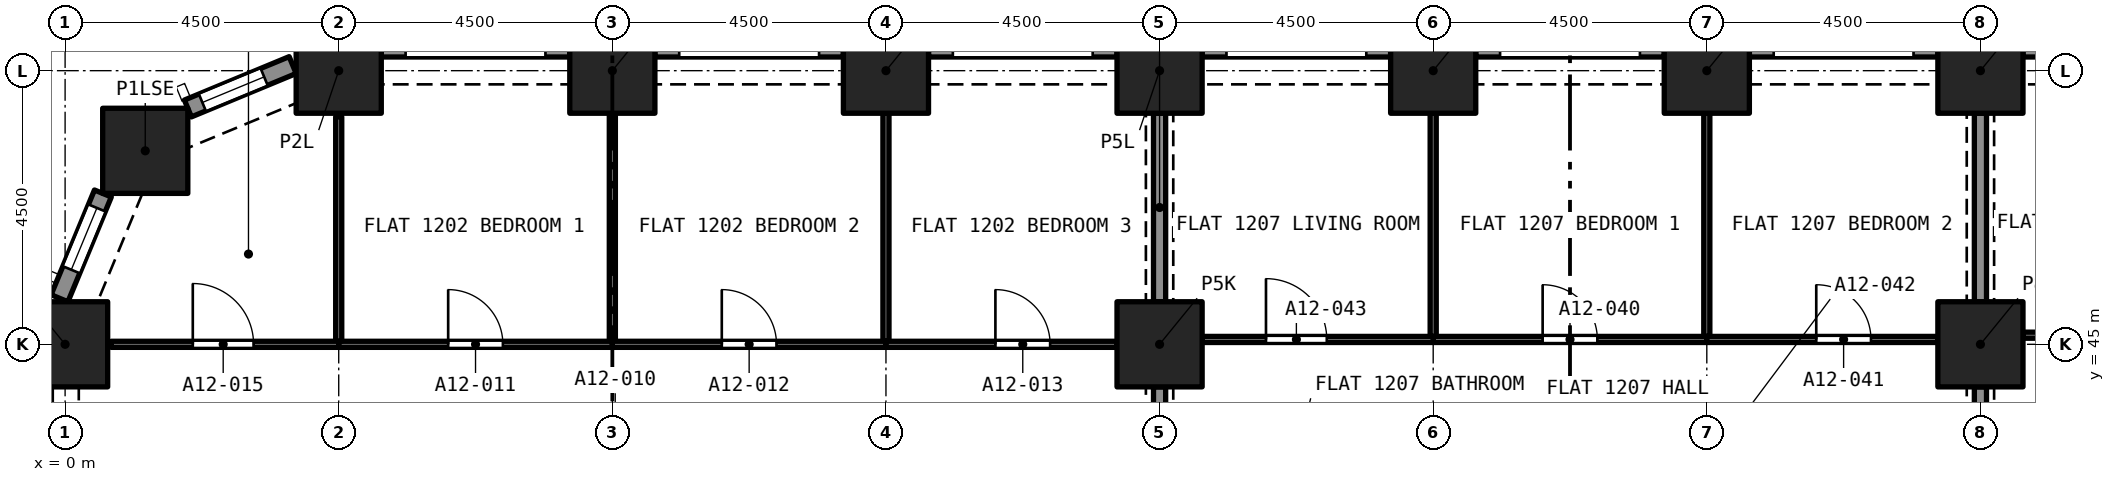
"""IFC4 building model, lengths in metres.
Left out: names, types, materials, properties, quantities, classifications, styles, units other than length and angle.
Written with IfcOpenShell. Run it as: python <this file> out.ifc"""

import sys

from ifc_helpers import new_model, si_unit, direction, frame, frame_2d, origin, origin_2d, place, context, subcontext, project, spatial, rectangle, extrude, element, fill, save


model = new_model("IFC4")
c1 = context("Model", 3, precision=1e-05, world=origin(), true_north=direction((0.0, 1.0)))
c2 = subcontext(c1, "Body", "Model", "MODEL_VIEW")
j1 = project(units=[si_unit("LENGTHUNIT", "METRE"), si_unit("PLANEANGLEUNIT", "RADIAN")], contexts=[c1])
p1 = place(None, origin())
s1 = spatial("IfcSite", under=j1, at=p1, CompositionType="ELEMENT")
p2 = place(p1, origin())
s2 = spatial("IfcBuilding", under=s1, at=p2, CompositionType="ELEMENT")
p3 = place(p2, frame((0.0, 0.0, 49.6)))
s3 = spatial("IfcBuildingStorey", under=s2, at=p3, CompositionType="ELEMENT", Elevation=49.6)
for number, where, z_axis, x_axis in (
    (1, (0.0, 45.0, 0.0), (0.0, 0.0, 1.0), (1.0, 0.0, 0.0)),
    (2, (18.0, 45.0, 0.0), (0.0, 0.0, 1.0), (1.0, 0.0, 0.0)),
    (3, (31.5, 45.0, 0.0), (0.0, 0.0, 1.0), (1.0, 0.0, 0.0)),
    (4, (1.318, 48.182, 0.0), (0.0, 0.0, 1.0), (1.0, 0.0, 0.0)),
    (5, (4.5, 49.5, 0.0), (0.0, 0.0, 1.0), (1.0, 0.0, 0.0)),
    (6, (9.0, 49.5, 0.0), (0.0, 0.0, 1.0), (1.0, 0.0, 0.0)),
    (7, (13.5, 49.5, 0.0), (0.0, 0.0, 1.0), (1.0, 0.0, 0.0)),
    (8, (18.0, 49.5, 0.0), (0.0, 0.0, 1.0), (1.0, 0.0, 0.0)),
    (9, (22.5, 49.5, 0.0), (0.0, 0.0, 1.0), (1.0, 0.0, 0.0)),
    (10, (27.0, 49.5, 0.0), (0.0, 0.0, 1.0), (1.0, 0.0, 0.0)),
    (11, (31.5, 49.5, 0.0), (0.0, 0.0, 1.0), (1.0, 0.0, 0.0)),
):
    element("IfcColumn", number, at=place(p3, frame(where, z_axis=z_axis, x_axis=x_axis)), inside=s3, PredefinedType="COLUMN", context=c2, shape_type="SweptSolid", body=[
        extrude(rectangle(XDim=1.4, YDim=1.4, at=origin_2d()), origin(), (0.0, 0.0, 1.0), 3.2),
    ])
p4 = place(p3, frame((32.2, 49.875, 0.0), z_axis=(0.0, 0.0, 1.0), x_axis=(1.0, 0.0, 0.0)))
e12 = element("IfcWall", 12, at=p4, inside=s3, PredefinedType="SOLIDWALL", context=c2, shape_type="SweptSolid", body=[
    extrude(rectangle(XDim=3.1, YDim=0.3, at=frame_2d((1.55, 0.0))), origin(), (0.0, 0.0, 1.0), 3.2),
])
p5 = place(p4, frame((0.4, 0.0, 0.45)))
e13 = element("IfcOpeningElement", 13, at=p5, cuts=e12, PredefinedType="OPENING", context=c2, shape_type="SweptSolid", body=[
    extrude(rectangle(XDim=2.3, YDim=1.95, at=frame_2d((1.15, 0.975))), frame((0.0, 0.16, 0.0), z_axis=(0.0, -1.0, 0.0), x_axis=(1.0, 0.0, 0.0)), (0.0, 0.0, 1.0), 0.32),
])
p6 = place(p3, frame((27.7, 49.875, 0.0), z_axis=(0.0, 0.0, 1.0), x_axis=(1.0, 0.0, 0.0)))
e14 = element("IfcWall", 14, at=p6, inside=s3, PredefinedType="SOLIDWALL", context=c2, shape_type="SweptSolid", body=[
    extrude(rectangle(XDim=3.1, YDim=0.3, at=frame_2d((1.55, 0.0))), origin(), (0.0, 0.0, 1.0), 3.2),
])
p7 = place(p6, frame((0.4, 0.0, 0.45)))
e15 = element("IfcOpeningElement", 15, at=p7, cuts=e14, PredefinedType="OPENING", context=c2, shape_type="SweptSolid", body=[
    extrude(rectangle(XDim=2.3, YDim=1.95, at=frame_2d((1.15, 0.975))), frame((0.0, 0.16, 0.0), z_axis=(0.0, -1.0, 0.0), x_axis=(1.0, 0.0, 0.0)), (0.0, 0.0, 1.0), 0.32),
])
p8 = place(p3, frame((23.2, 49.875, 0.0), z_axis=(0.0, 0.0, 1.0), x_axis=(1.0, 0.0, 0.0)))
e16 = element("IfcWall", 16, at=p8, inside=s3, PredefinedType="SOLIDWALL", context=c2, shape_type="SweptSolid", body=[
    extrude(rectangle(XDim=3.1, YDim=0.3, at=frame_2d((1.55, 0.0))), origin(), (0.0, 0.0, 1.0), 3.2),
])
p9 = place(p8, frame((0.4, 0.0, 0.45)))
e17 = element("IfcOpeningElement", 17, at=p9, cuts=e16, PredefinedType="OPENING", context=c2, shape_type="SweptSolid", body=[
    extrude(rectangle(XDim=2.3, YDim=1.95, at=frame_2d((1.15, 0.975))), frame((0.0, 0.16, 0.0), z_axis=(0.0, -1.0, 0.0), x_axis=(1.0, 0.0, 0.0)), (0.0, 0.0, 1.0), 0.32),
])
p10 = place(p3, frame((18.7, 49.875, 0.0), z_axis=(0.0, 0.0, 1.0), x_axis=(1.0, 0.0, 0.0)))
e18 = element("IfcWall", 18, at=p10, inside=s3, PredefinedType="SOLIDWALL", context=c2, shape_type="SweptSolid", body=[
    extrude(rectangle(XDim=3.1, YDim=0.3, at=frame_2d((1.55, 0.0))), origin(), (0.0, 0.0, 1.0), 3.2),
])
p11 = place(p10, frame((0.4, 0.0, 0.45)))
e19 = element("IfcOpeningElement", 19, at=p11, cuts=e18, PredefinedType="OPENING", context=c2, shape_type="SweptSolid", body=[
    extrude(rectangle(XDim=2.3, YDim=1.95, at=frame_2d((1.15, 0.975))), frame((0.0, 0.16, 0.0), z_axis=(0.0, -1.0, 0.0), x_axis=(1.0, 0.0, 0.0)), (0.0, 0.0, 1.0), 0.32),
])
p12 = place(p3, frame((14.2, 49.875, 0.0), z_axis=(0.0, 0.0, 1.0), x_axis=(1.0, 0.0, 0.0)))
e20 = element("IfcWall", 20, at=p12, inside=s3, PredefinedType="SOLIDWALL", context=c2, shape_type="SweptSolid", body=[
    extrude(rectangle(XDim=3.1, YDim=0.3, at=frame_2d((1.55, 0.0))), origin(), (0.0, 0.0, 1.0), 3.2),
])
p13 = place(p12, frame((0.4, 0.0, 0.45)))
e21 = element("IfcOpeningElement", 21, at=p13, cuts=e20, PredefinedType="OPENING", context=c2, shape_type="SweptSolid", body=[
    extrude(rectangle(XDim=2.3, YDim=1.95, at=frame_2d((1.15, 0.975))), frame((0.0, 0.16, 0.0), z_axis=(0.0, -1.0, 0.0), x_axis=(1.0, 0.0, 0.0)), (0.0, 0.0, 1.0), 0.32),
])
p14 = place(p3, frame((9.7, 49.875, 0.0), z_axis=(0.0, 0.0, 1.0), x_axis=(1.0, 0.0, 0.0)))
e22 = element("IfcWall", 22, at=p14, inside=s3, PredefinedType="SOLIDWALL", context=c2, shape_type="SweptSolid", body=[
    extrude(rectangle(XDim=3.1, YDim=0.3, at=frame_2d((1.55, 0.0))), origin(), (0.0, 0.0, 1.0), 3.2),
])
p15 = place(p14, frame((0.4, 0.0, 0.45)))
e23 = element("IfcOpeningElement", 23, at=p15, cuts=e22, PredefinedType="OPENING", context=c2, shape_type="SweptSolid", body=[
    extrude(rectangle(XDim=2.3, YDim=1.95, at=frame_2d((1.15, 0.975))), frame((0.0, 0.16, 0.0), z_axis=(0.0, -1.0, 0.0), x_axis=(1.0, 0.0, 0.0)), (0.0, 0.0, 1.0), 0.32),
])
p16 = place(p3, frame((5.2, 49.875, 0.0), z_axis=(0.0, 0.0, 1.0), x_axis=(1.0, 0.0, 0.0)))
e24 = element("IfcWall", 24, at=p16, inside=s3, PredefinedType="SOLIDWALL", context=c2, shape_type="SweptSolid", body=[
    extrude(rectangle(XDim=3.1, YDim=0.3, at=frame_2d((1.55, 0.0))), origin(), (0.0, 0.0, 1.0), 3.2),
])
p17 = place(p16, frame((0.4, 0.0, 0.45)))
e25 = element("IfcOpeningElement", 25, at=p17, cuts=e24, PredefinedType="OPENING", context=c2, shape_type="SweptSolid", body=[
    extrude(rectangle(XDim=2.3, YDim=1.95, at=frame_2d((1.15, 0.975))), frame((0.0, 0.16, 0.0), z_axis=(0.0, -1.0, 0.0), x_axis=(1.0, 0.0, 0.0)), (0.0, 0.0, 1.0), 0.32),
])
p18 = place(p3, frame((2.02, 48.878, 0.0), z_axis=(0.0, 0.0, 1.0), x_axis=(0.923903565336, 0.38262540684, 0.0)))
e26 = element("IfcWall", 26, at=p18, inside=s3, PredefinedType="SOLIDWALL", context=c2, shape_type="SweptSolid", body=[
    extrude(rectangle(XDim=1.865, YDim=0.3, at=frame_2d((0.933, 0.0))), origin(), (0.0, 0.0, 1.0), 3.2),
])
p19 = place(p18, frame((0.258, 0.0, 0.45)))
e27 = element("IfcOpeningElement", 27, at=p19, cuts=e26, PredefinedType="OPENING", context=c2, shape_type="SweptSolid", body=[
    extrude(rectangle(XDim=1.1, YDim=1.95, at=frame_2d((0.55, 0.975))), frame((0.0, 0.16, 0.0), z_axis=(0.0, -1.0, 0.0), x_axis=(1.0, 0.0, 0.0)), (0.0, 0.0, 1.0), 0.32),
])
p20 = place(p3, frame((-0.092, 45.757, 0.0), z_axis=(0.0, 0.0, 1.0), x_axis=(0.382737135771, 0.923857286003, 0.0)))
e28 = element("IfcWall", 28, at=p20, inside=s3, PredefinedType="SOLIDWALL", context=c2, shape_type="SweptSolid", body=[
    extrude(rectangle(XDim=1.865, YDim=0.3, at=frame_2d((0.933, 0.0))), origin(), (0.0, 0.0, 1.0), 3.2),
])
p21 = place(p20, frame((0.508, 0.0, 0.45)))
e29 = element("IfcOpeningElement", 29, at=p21, cuts=e28, PredefinedType="OPENING", context=c2, shape_type="SweptSolid", body=[
    extrude(rectangle(XDim=1.1, YDim=1.95, at=frame_2d((0.55, 0.975))), frame((0.0, 0.16, 0.0), z_axis=(0.0, -1.0, 0.0), x_axis=(1.0, 0.0, 0.0)), (0.0, 0.0, 1.0), 0.32),
])
p22 = place(p3, frame((9.0, 45.05, 0.0), z_axis=(0.0, 0.0, 1.0), x_axis=(0.0, 1.0, 0.0)))
e30 = element("IfcWall", 30, at=p22, inside=s3, PredefinedType="PARTITIONING", context=c2, shape_type="SweptSolid", body=[
    extrude(rectangle(XDim=3.75, YDim=0.1, at=frame_2d((1.875, 0.0))), origin(), (0.0, 0.0, 1.0), 2.9),
])
p23 = place(p3, frame((4.5, 45.0, 0.0), z_axis=(0.0, 0.0, 1.0), x_axis=(1.0, 0.0, 0.0)))
e31 = element("IfcWall", 31, at=p23, inside=s3, PredefinedType="PARTITIONING", context=c2, shape_type="SweptSolid", body=[
    extrude(rectangle(XDim=4.5, YDim=0.1, at=frame_2d((2.25, 0.0))), origin(), (0.0, 0.0, 1.0), 2.9),
])
p24 = place(p23, frame((1.8, 0.0, 0.0)))
e32 = element("IfcOpeningElement", 32, at=p24, cuts=e31, PredefinedType="OPENING", context=c2, shape_type="SweptSolid", body=[
    extrude(rectangle(XDim=0.9, YDim=2.1, at=frame_2d((0.45, 1.05))), frame((0.0, 0.06, 0.0), z_axis=(0.0, -1.0, 0.0), x_axis=(1.0, 0.0, 0.0)), (0.0, 0.0, 1.0), 0.12),
])
p25 = place(p3, frame((4.5, 45.05, 0.0), z_axis=(0.0, 0.0, 1.0), x_axis=(0.0, 1.0, 0.0)))
e33 = element("IfcWall", 33, at=p25, inside=s3, PredefinedType="PARTITIONING", context=c2, shape_type="SweptSolid", body=[
    extrude(rectangle(XDim=3.692, YDim=0.1, at=frame_2d((1.846, 0.0))), origin(), (0.0, 0.0, 1.0), 2.9),
])
p26 = place(p3, frame((13.5, 45.05, 0.0), z_axis=(0.0, 0.0, 1.0), x_axis=(0.0, 1.0, 0.0)))
e34 = element("IfcWall", 34, at=p26, inside=s3, PredefinedType="PARTITIONING", context=c2, shape_type="SweptSolid", body=[
    extrude(rectangle(XDim=3.75, YDim=0.1, at=frame_2d((1.875, 0.0))), origin(), (0.0, 0.0, 1.0), 2.9),
])
p27 = place(p3, frame((9.0, 45.0, 0.0), z_axis=(0.0, 0.0, 1.0), x_axis=(1.0, 0.0, 0.0)))
e35 = element("IfcWall", 35, at=p27, inside=s3, PredefinedType="PARTITIONING", context=c2, shape_type="SweptSolid", body=[
    extrude(rectangle(XDim=4.5, YDim=0.1, at=frame_2d((2.25, 0.0))), origin(), (0.0, 0.0, 1.0), 2.9),
])
p28 = place(p27, frame((1.8, 0.0, 0.0)))
e36 = element("IfcOpeningElement", 36, at=p28, cuts=e35, PredefinedType="OPENING", context=c2, shape_type="SweptSolid", body=[
    extrude(rectangle(XDim=0.9, YDim=2.1, at=frame_2d((0.45, 1.05))), frame((0.0, 0.06, 0.0), z_axis=(0.0, -1.0, 0.0), x_axis=(1.0, 0.0, 0.0)), (0.0, 0.0, 1.0), 0.12),
])
p29 = place(p3, frame((13.5, 45.0, 0.0), z_axis=(0.0, 0.0, 1.0), x_axis=(1.0, 0.0, 0.0)))
e37 = element("IfcWall", 37, at=p29, inside=s3, PredefinedType="PARTITIONING", context=c2, shape_type="SweptSolid", body=[
    extrude(rectangle(XDim=3.8, YDim=0.1, at=frame_2d((1.9, 0.0))), origin(), (0.0, 0.0, 1.0), 2.9),
])
p30 = place(p29, frame((1.8, 0.0, 0.0)))
e38 = element("IfcOpeningElement", 38, at=p30, cuts=e37, PredefinedType="OPENING", context=c2, shape_type="SweptSolid", body=[
    extrude(rectangle(XDim=0.9, YDim=2.1, at=frame_2d((0.45, 1.05))), frame((0.0, 0.06, 0.0), z_axis=(0.0, -1.0, 0.0), x_axis=(1.0, 0.0, 0.0)), (0.0, 0.0, 1.0), 0.12),
])
p31 = place(p3, frame((18.0, 45.7, 0.0), z_axis=(0.0, 0.0, 1.0), x_axis=(0.0, 1.0, 0.0)))
e39 = element("IfcWall", 39, at=p31, inside=s3, PredefinedType="PARTITIONING", context=c2, shape_type="SweptSolid", body=[
    extrude(rectangle(XDim=3.1, YDim=0.2, at=frame_2d((1.55, 0.0))), origin(), (0.0, 0.0, 1.0), 2.38),
])
p32 = place(p3, frame((0.758, 45.0, 0.0), z_axis=(0.0, 0.0, 1.0), x_axis=(1.0, 0.0, 0.0)))
e40 = element("IfcWall", 40, at=p32, inside=s3, PredefinedType="PARTITIONING", context=c2, shape_type="SweptSolid", body=[
    extrude(rectangle(XDim=3.742, YDim=0.1, at=frame_2d((1.871, 0.0))), origin(), (0.0, 0.0, 1.0), 2.9),
])
p33 = place(p32, frame((1.342, 0.0, 0.0)))
e41 = element("IfcOpeningElement", 41, at=p33, cuts=e40, PredefinedType="OPENING", context=c2, shape_type="SweptSolid", body=[
    extrude(rectangle(XDim=1.0, YDim=2.1, at=frame_2d((0.5, 1.05))), frame((0.0, 0.06, 0.0), z_axis=(0.0, -1.0, 0.0), x_axis=(1.0, 0.0, 0.0)), (0.0, 0.0, 1.0), 0.12),
])
p34 = place(p3, frame((18.0, 43.67, 0.0), z_axis=(0.0, 0.0, 1.0), x_axis=(0.0, 1.0, 0.0)))
e42 = element("IfcWall", 42, at=p34, inside=s3, PredefinedType="PARTITIONING", context=c2, shape_type="SweptSolid", body=[
    extrude(rectangle(XDim=0.63, YDim=0.2, at=frame_2d((0.315, 0.0))), origin(), (0.0, 0.0, 1.0), 2.38),
])
p35 = place(p3, frame((32.2, 45.15, 0.0), z_axis=(0.0, 0.0, 1.0), x_axis=(1.0, 0.0, 0.0)))
e43 = element("IfcWall", 43, at=p35, inside=s3, PredefinedType="PARTITIONING", context=c2, shape_type="SweptSolid", body=[
    extrude(rectangle(XDim=3.8, YDim=0.1, at=frame_2d((1.9, 0.0))), origin(), (0.0, 0.0, 1.0), 2.9),
])
p36 = place(p35, frame((1.05, 0.0, 0.0)))
e44 = element("IfcOpeningElement", 44, at=p36, cuts=e43, PredefinedType="OPENING", context=c2, shape_type="SweptSolid", body=[
    extrude(rectangle(XDim=1.0, YDim=2.1, at=frame_2d((0.5, 1.05))), frame((0.0, 0.06, 0.0), z_axis=(0.0, -1.0, 0.0), x_axis=(1.0, 0.0, 0.0)), (0.0, 0.0, 1.0), 0.12),
])
for number, where, z_axis, x_axis in (
    (45, (31.5, 41.2, 0.0), (0.0, 0.0, 1.0), (0.0, 1.0, 0.0)),
    (46, (31.5, 45.7, 0.0), (0.0, 0.0, 1.0), (0.0, 1.0, 0.0)),
):
    element("IfcWall", number, at=place(p3, frame(where, z_axis=z_axis, x_axis=x_axis)), inside=s3, PredefinedType="PARTITIONING", context=c2, shape_type="SweptSolid", body=[
        extrude(rectangle(XDim=3.1, YDim=0.2, at=frame_2d((1.55, 0.0))), origin(), (0.0, 0.0, 1.0), 2.38),
    ])
p37 = place(p3, frame((27.0, 45.13, 0.0), z_axis=(0.0, 0.0, 1.0), x_axis=(0.0, 1.0, 0.0)))
e47 = element("IfcWall", 47, at=p37, inside=s3, PredefinedType="PARTITIONING", context=c2, shape_type="SweptSolid", body=[
    extrude(rectangle(XDim=3.67, YDim=0.1, at=frame_2d((1.835, 0.0))), origin(), (0.0, 0.0, 1.0), 2.75),
])
p38 = place(p3, frame((22.5, 45.08, 0.0), z_axis=(0.0, 0.0, 1.0), x_axis=(1.0, 0.0, 0.0)))
e48 = element("IfcWall", 48, at=p38, inside=s3, PredefinedType="PARTITIONING", context=c2, shape_type="SweptSolid", body=[
    extrude(rectangle(XDim=4.5, YDim=0.1, at=frame_2d((2.25, 0.0))), origin(), (0.0, 0.0, 1.0), 2.75),
])
p39 = place(p38, frame((1.8, 0.0, 0.0)))
e49 = element("IfcOpeningElement", 49, at=p39, cuts=e48, PredefinedType="OPENING", context=c2, shape_type="SweptSolid", body=[
    extrude(rectangle(XDim=0.9, YDim=2.1, at=frame_2d((0.45, 1.05))), frame((0.0, 0.06, 0.0), z_axis=(0.0, -1.0, 0.0), x_axis=(1.0, 0.0, 0.0)), (0.0, 0.0, 1.0), 0.12),
])
p40 = place(p3, frame((22.5, 45.13, 0.0), z_axis=(0.0, 0.0, 1.0), x_axis=(0.0, 1.0, 0.0)))
e50 = element("IfcWall", 50, at=p40, inside=s3, PredefinedType="PARTITIONING", context=c2, shape_type="SweptSolid", body=[
    extrude(rectangle(XDim=3.67, YDim=0.1, at=frame_2d((1.835, 0.0))), origin(), (0.0, 0.0, 1.0), 2.75),
])
p41 = place(p3, frame((27.0, 45.08, 0.0), z_axis=(0.0, 0.0, 1.0), x_axis=(1.0, 0.0, 0.0)))
e51 = element("IfcWall", 51, at=p41, inside=s3, PredefinedType="PARTITIONING", context=c2, shape_type="SweptSolid", body=[
    extrude(rectangle(XDim=3.8, YDim=0.1, at=frame_2d((1.9, 0.0))), origin(), (0.0, 0.0, 1.0), 2.75),
])
p42 = place(p41, frame((1.8, 0.0, 0.0)))
e52 = element("IfcOpeningElement", 52, at=p42, cuts=e51, PredefinedType="OPENING", context=c2, shape_type="SweptSolid", body=[
    extrude(rectangle(XDim=0.9, YDim=2.1, at=frame_2d((0.45, 1.05))), frame((0.0, 0.06, 0.0), z_axis=(0.0, -1.0, 0.0), x_axis=(1.0, 0.0, 0.0)), (0.0, 0.0, 1.0), 0.12),
])
p43 = place(p3, frame((18.7, 45.08, 0.0), z_axis=(0.0, 0.0, 1.0), x_axis=(1.0, 0.0, 0.0)))
e53 = element("IfcWall", 53, at=p43, inside=s3, PredefinedType="PARTITIONING", context=c2, shape_type="SweptSolid", body=[
    extrude(rectangle(XDim=3.8, YDim=0.1, at=frame_2d((1.9, 0.0))), origin(), (0.0, 0.0, 1.0), 2.75),
])
p44 = place(p43, frame((1.05, 0.0, 0.0)))
e54 = element("IfcOpeningElement", 54, at=p44, cuts=e53, PredefinedType="OPENING", context=c2, shape_type="SweptSolid", body=[
    extrude(rectangle(XDim=1.0, YDim=2.1, at=frame_2d((0.5, 1.05))), frame((0.0, 0.06, 0.0), z_axis=(0.0, -1.0, 0.0), x_axis=(1.0, 0.0, 0.0)), (0.0, 0.0, 1.0), 0.12),
])
p45 = place(p19, origin())
e55 = element("IfcWindow", 55, at=p45, inside=s3, PartitioningType="SINGLE_PANEL", PredefinedType="WINDOW", context=c2, shape_type="SweptSolid", body=[
    extrude(rectangle(XDim=1.1, YDim=1.95, at=frame_2d((0.55, 0.975))), frame((0.0, 0.03, 0.0), z_axis=(0.0, -1.0, 0.0), x_axis=(1.0, 0.0, 0.0)), (0.0, 0.0, 1.0), 0.06),
])
fill(e27, e55)
p46 = place(p21, origin())
e56 = element("IfcWindow", 56, at=p46, inside=s3, PartitioningType="SINGLE_PANEL", PredefinedType="WINDOW", context=c2, shape_type="SweptSolid", body=[
    extrude(rectangle(XDim=1.1, YDim=1.95, at=frame_2d((0.55, 0.975))), frame((0.0, 0.03, 0.0), z_axis=(0.0, -1.0, 0.0), x_axis=(1.0, 0.0, 0.0)), (0.0, 0.0, 1.0), 0.06),
])
fill(e29, e56)
p47 = place(p24, origin())
e57 = element("IfcDoor", 57, at=p47, inside=s3, OperationType="SINGLE_SWING_RIGHT", PredefinedType="DOOR", context=c2, shape_type="SweptSolid", body=[
    extrude(rectangle(XDim=0.9, YDim=2.1, at=frame_2d((0.45, 1.05))), frame((0.0, 0.025, 0.0), z_axis=(0.0, -1.0, 0.0), x_axis=(1.0, 0.0, 0.0)), (0.0, 0.0, 1.0), 0.05),
])
fill(e32, e57)
p48 = place(p28, origin())
e58 = element("IfcDoor", 58, at=p48, inside=s3, OperationType="SINGLE_SWING_LEFT", PredefinedType="DOOR", context=c2, shape_type="SweptSolid", body=[
    extrude(rectangle(XDim=0.9, YDim=2.1, at=frame_2d((0.45, 1.05))), frame((0.0, 0.025, 0.0), z_axis=(0.0, -1.0, 0.0), x_axis=(1.0, 0.0, 0.0)), (0.0, 0.0, 1.0), 0.05),
])
fill(e36, e58)
p49 = place(p30, origin())
e59 = element("IfcDoor", 59, at=p49, inside=s3, OperationType="SINGLE_SWING_RIGHT", PredefinedType="DOOR", context=c2, shape_type="SweptSolid", body=[
    extrude(rectangle(XDim=0.9, YDim=2.1, at=frame_2d((0.45, 1.05))), frame((0.0, 0.025, 0.0), z_axis=(0.0, -1.0, 0.0), x_axis=(1.0, 0.0, 0.0)), (0.0, 0.0, 1.0), 0.05),
])
fill(e38, e59)
p50 = place(p33, origin())
e60 = element("IfcDoor", 60, at=p50, inside=s3, OperationType="SINGLE_SWING_LEFT", PredefinedType="DOOR", context=c2, shape_type="SweptSolid", body=[
    extrude(rectangle(XDim=1.0, YDim=2.1, at=frame_2d((0.5, 1.05))), frame((0.0, 0.025, 0.0), z_axis=(0.0, -1.0, 0.0), x_axis=(1.0, 0.0, 0.0)), (0.0, 0.0, 1.0), 0.05),
])
fill(e41, e60)
p51 = place(p39, origin())
e61 = element("IfcDoor", 61, at=p51, inside=s3, OperationType="SINGLE_SWING_LEFT", PredefinedType="DOOR", context=c2, shape_type="SweptSolid", body=[
    extrude(rectangle(XDim=0.9, YDim=2.1, at=frame_2d((0.45, 1.05))), frame((0.0, 0.025, 0.0), z_axis=(0.0, -1.0, 0.0), x_axis=(1.0, 0.0, 0.0)), (0.0, 0.0, 1.0), 0.05),
])
fill(e49, e61)
p52 = place(p42, origin())
e62 = element("IfcDoor", 62, at=p52, inside=s3, OperationType="SINGLE_SWING_RIGHT", PredefinedType="DOOR", context=c2, shape_type="SweptSolid", body=[
    extrude(rectangle(XDim=0.9, YDim=2.1, at=frame_2d((0.45, 1.05))), frame((0.0, 0.025, 0.0), z_axis=(0.0, -1.0, 0.0), x_axis=(1.0, 0.0, 0.0)), (0.0, 0.0, 1.0), 0.05),
])
fill(e52, e62)
p53 = place(p44, origin())
e63 = element("IfcDoor", 63, at=p53, inside=s3, OperationType="SINGLE_SWING_LEFT", PredefinedType="DOOR", context=c2, shape_type="SweptSolid", body=[
    extrude(rectangle(XDim=1.0, YDim=2.1, at=frame_2d((0.5, 1.05))), frame((0.0, 0.025, 0.0), z_axis=(0.0, -1.0, 0.0), x_axis=(1.0, 0.0, 0.0)), (0.0, 0.0, 1.0), 0.05),
])
fill(e54, e63)
save(model, sys.argv[1])
